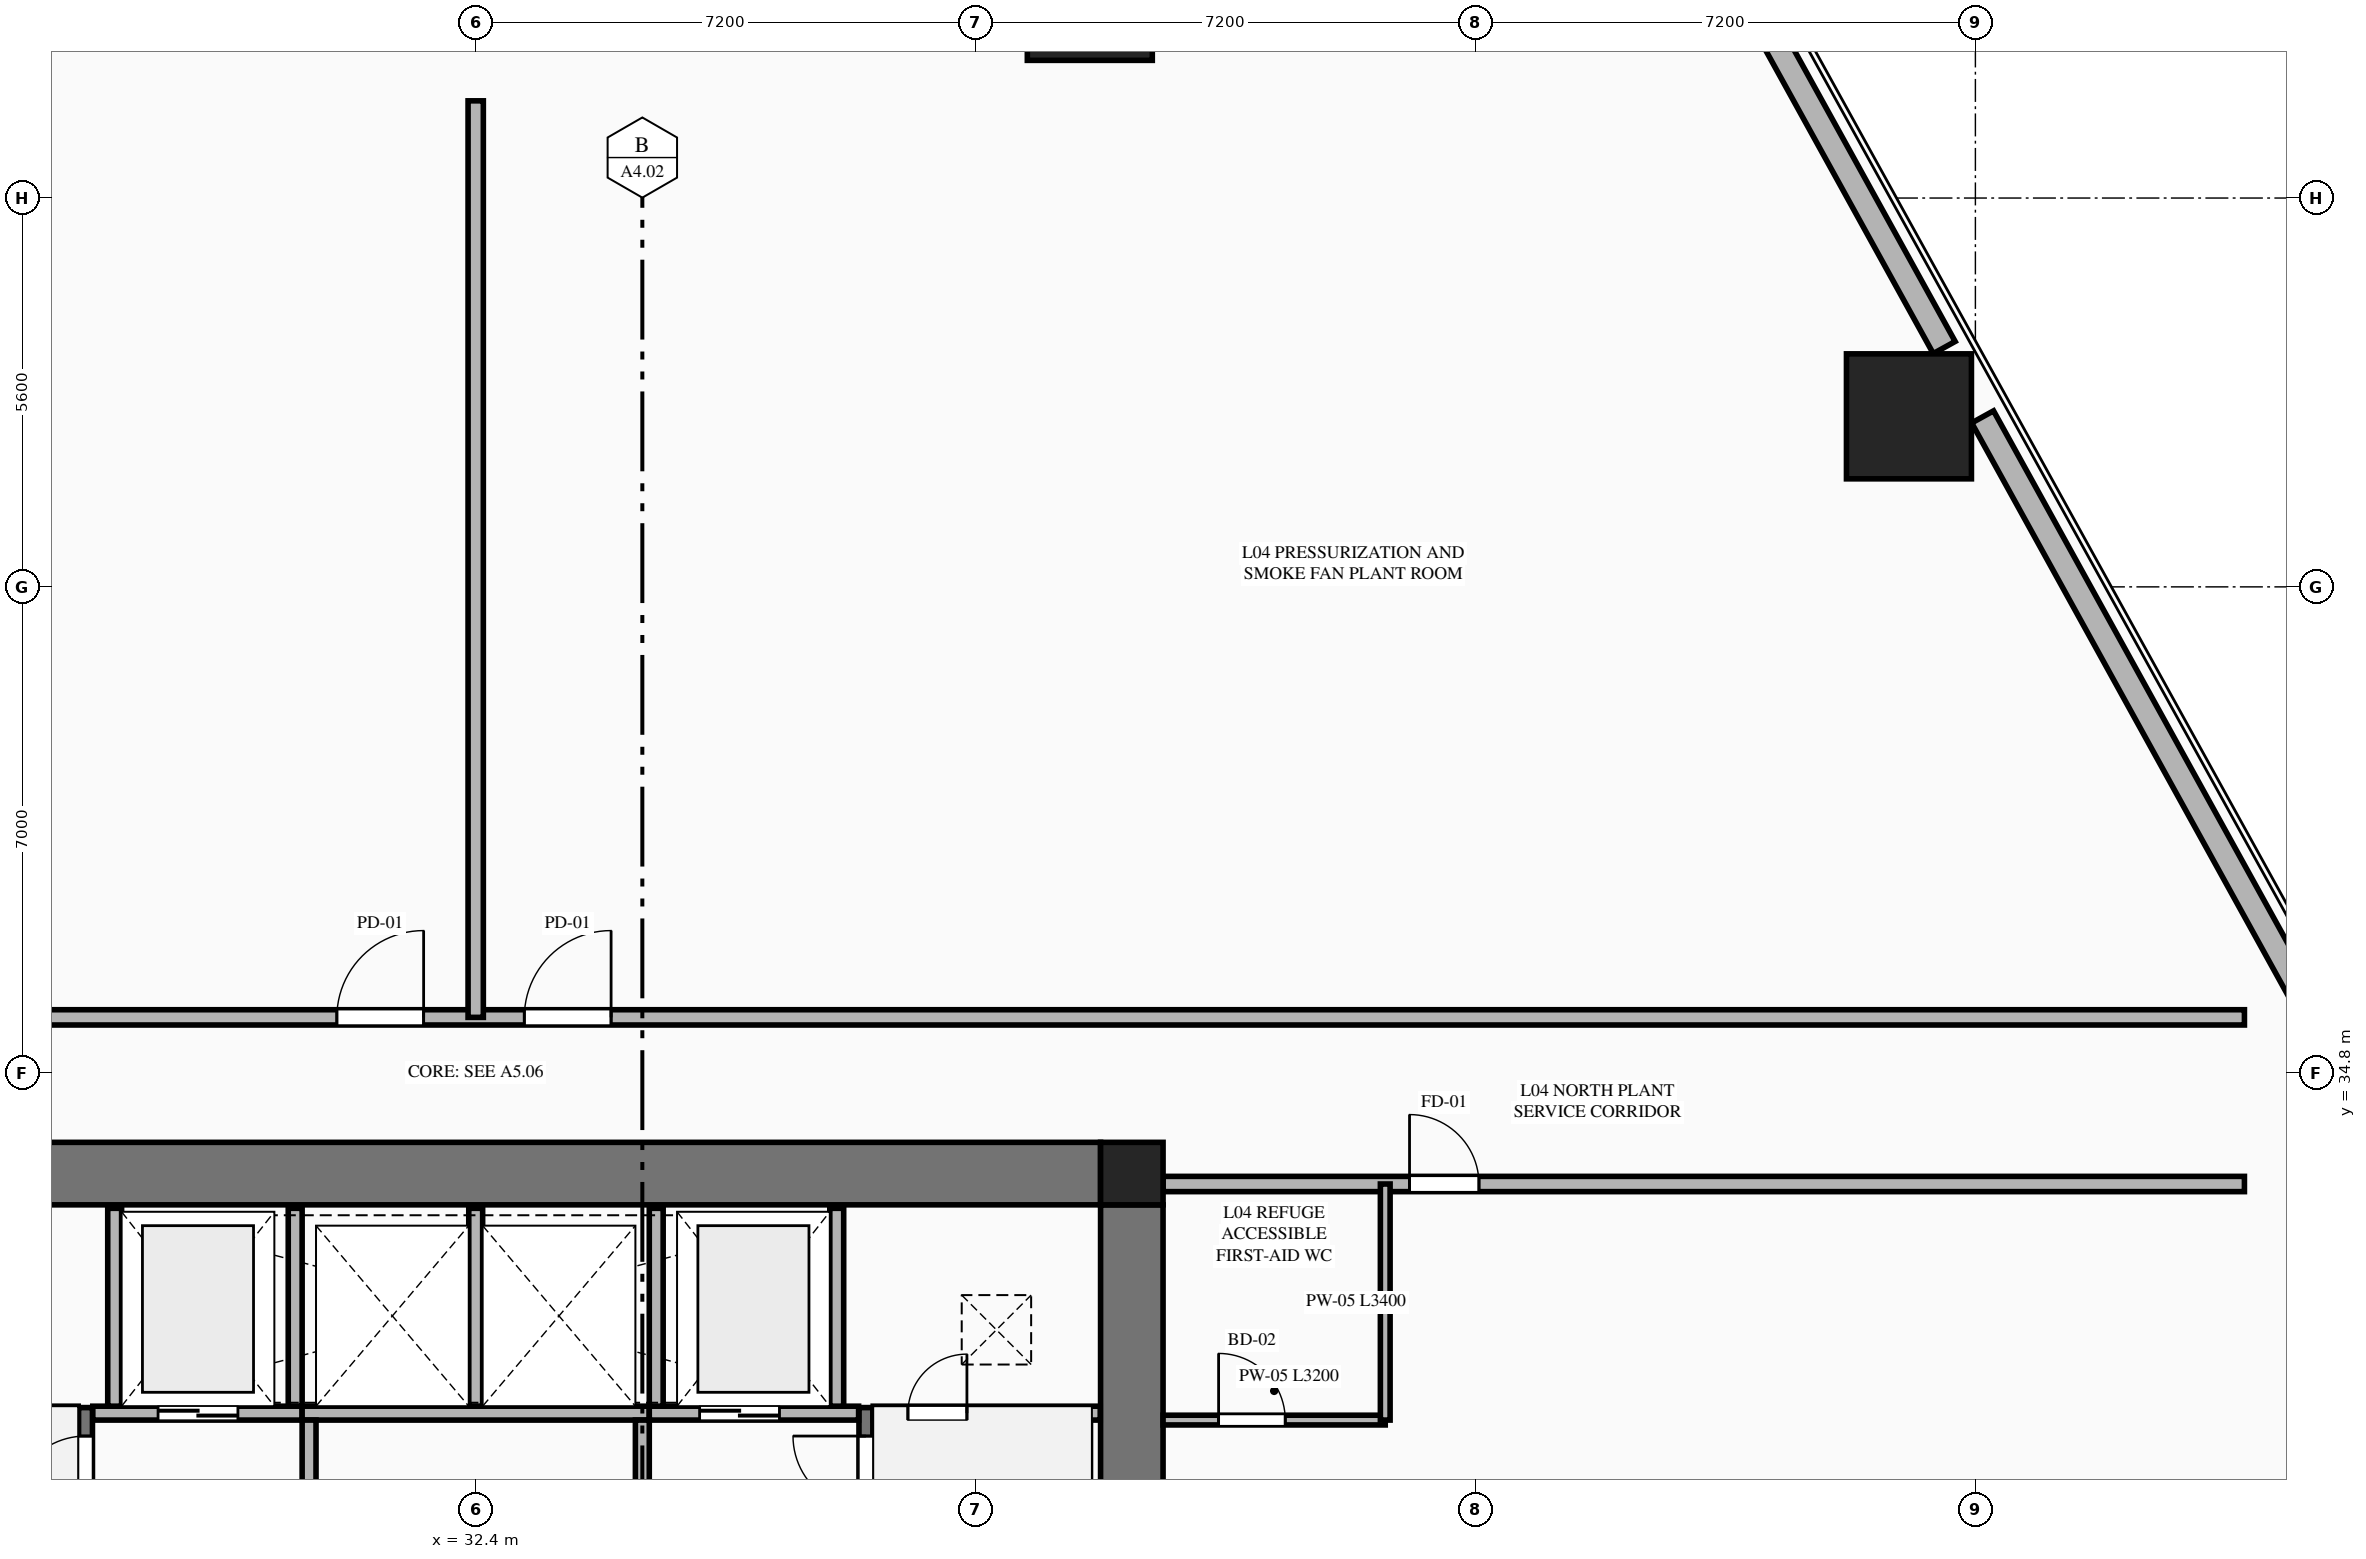
"""IFC4 building model, lengths in metres.
Left out: names, types, materials, properties, quantities, classifications, styles, units other than length and angle.
Written with IfcOpenShell. Run it as: python <this file> out.ifc"""

import sys

from ifc_helpers import new_model, si_unit, direction, frame, frame_2d, origin, origin_2d, place, context, subcontext, project, spatial, rectangle, extrude, element, fill, save


model = new_model("IFC4")
c1 = context("Model", 3, precision=1e-05, world=origin(), true_north=direction((0.0, 1.0)))
c2 = subcontext(c1, "Body", "Model", "MODEL_VIEW")
j1 = project(units=[si_unit("LENGTHUNIT", "METRE"), si_unit("PLANEANGLEUNIT", "RADIAN")], contexts=[c1])
p1 = place(None, origin())
s1 = spatial("IfcSite", under=j1, at=p1, CompositionType="ELEMENT")
p2 = place(p1, origin())
s2 = spatial("IfcBuilding", under=s1, at=p2, CompositionType="ELEMENT")
p3 = place(p2, frame((0.0, 0.0, 19.5)))
s3 = spatial("IfcBuildingStorey", under=s2, at=p3, CompositionType="ELEMENT", Elevation=19.5)
p4 = place(p3, frame((41.85, 33.35, 0.0), z_axis=(0.0, 0.0, 1.0), x_axis=(1.0, 0.0, 0.0)))
e1 = element("IfcColumn", 1, at=p4, inside=s3, PredefinedType="COLUMN", context=c2, shape_type="SweptSolid", body=[
    extrude(rectangle(XDim=0.9, YDim=0.9, at=origin_2d()), origin(), (0.0, 0.0, 1.0), 5.4),
])
p5 = place(p3, frame((23.4, 33.35, 0.0), z_axis=(0.0, 0.0, 1.0), x_axis=(1.0, 0.0, 0.0)))
e2 = element("IfcWall", 2, at=p5, inside=s3, PredefinedType="SHEAR", context=c2, shape_type="SweptSolid", body=[
    extrude(rectangle(XDim=18.0, YDim=0.9, at=frame_2d((9.0, 0.0))), origin(), (0.0, 0.0, 1.0), 5.18),
])
p6 = place(p3, frame((41.85, 18.9, 0.0), z_axis=(0.0, 0.0, 1.0), x_axis=(0.0, 1.0, 0.0)))
e3 = element("IfcWall", 3, at=p6, inside=s3, PredefinedType="SHEAR", context=c2, shape_type="SweptSolid", body=[
    extrude(rectangle(XDim=14.0, YDim=0.9, at=frame_2d((7.0, 0.0))), origin(), (0.0, 0.0, 1.0), 5.18),
])
p7 = place(p6, frame((2.94, 0.0, 0.0)))
e4 = element("IfcOpeningElement", 4, at=p7, cuts=e3, PredefinedType="OPENING", context=c2, shape_type="SweptSolid", body=[
    extrude(rectangle(XDim=1.22, YDim=2.25, at=frame_2d((0.61, 1.125))), frame((0.0, 0.46, 0.0), z_axis=(0.0, -1.0, 0.0), x_axis=(1.0, 0.0, 0.0)), (0.0, 0.0, 1.0), 0.92),
])
for number, where, z_axis, x_axis in (
    (5, (53.043, 44.256, 0.0), (0.0, 0.0, 1.0), (1.0, 0.0, 0.0)),
    (6, (41.245, 50.283, 0.0), (0.0, 0.0, 1.0), (1.0, 0.0, 0.0)),
):
    element("IfcColumn", number, at=place(p3, frame(where, z_axis=z_axis, x_axis=x_axis)), inside=s3, PredefinedType="COLUMN", context=c2, shape_type="SweptSolid", body=[
        extrude(rectangle(XDim=1.8, YDim=1.8, at=origin_2d()), origin(), (0.0, 0.0, 1.0), 5.4),
    ])
p8 = place(p3, frame((26.78, 23.2, 0.0), z_axis=(0.0, 0.0, 1.0), x_axis=(0.0, 1.0, 0.0)))
e7 = element("IfcWall", 7, at=p8, inside=s3, PredefinedType="SHEAR", context=c2, shape_type="SweptSolid", body=[
    extrude(rectangle(XDim=6.78, YDim=0.2, at=frame_2d((3.39, 0.0))), origin(), (0.0, 0.0, 1.0), 5.4),
])
p9 = place(p8, frame((5.32, 0.0, 0.0)))
e8 = element("IfcOpeningElement", 8, at=p9, cuts=e7, PredefinedType="OPENING", context=c2, shape_type="SweptSolid", body=[
    extrude(rectangle(XDim=1.05, YDim=2.15, at=frame_2d((0.525, 1.075))), frame((0.0, 0.11, 0.0), z_axis=(0.0, -1.0, 0.0), x_axis=(1.0, 0.0, 0.0)), (0.0, 0.0, 1.0), 0.22),
])
p10 = place(p3, frame((38.02, 23.2, 0.0), z_axis=(0.0, 0.0, 1.0), x_axis=(0.0, 1.0, 0.0)))
e9 = element("IfcWall", 9, at=p10, inside=s3, PredefinedType="SHEAR", context=c2, shape_type="SweptSolid", body=[
    extrude(rectangle(XDim=6.78, YDim=0.2, at=frame_2d((3.39, 0.0))), origin(), (0.0, 0.0, 1.0), 5.4),
])
p11 = place(p10, frame((5.32, 0.0, 0.0)))
e10 = element("IfcOpeningElement", 10, at=p11, cuts=e9, PredefinedType="OPENING", context=c2, shape_type="SweptSolid", body=[
    extrude(rectangle(XDim=1.05, YDim=2.15, at=frame_2d((0.525, 1.075))), frame((0.0, 0.11, 0.0), z_axis=(0.0, -1.0, 0.0), x_axis=(1.0, 0.0, 0.0)), (0.0, 0.0, 1.0), 0.22),
])
p12 = place(p3, frame((23.405, 29.9, 0.0), z_axis=(0.0, 0.0, 1.0), x_axis=(1.0, 0.0, 0.0)))
e11 = element("IfcWall", 11, at=p12, inside=s3, PredefinedType="PLUMBINGWALL", context=c2, shape_type="SweptSolid", body=[
    extrude(rectangle(XDim=3.27, YDim=0.2, at=frame_2d((1.635, 0.0))), origin(), (0.0, 0.0, 1.0), 5.18),
])
p13 = place(p12, frame((1.85, 0.0, 0.0)))
e12 = element("IfcOpeningElement", 12, at=p13, cuts=e11, PredefinedType="OPENING", context=c2, shape_type="SweptSolid", body=[
    extrude(rectangle(XDim=0.85, YDim=2.05, at=frame_2d((0.425, 1.025))), frame((0.0, 0.11, 0.0), z_axis=(0.0, -1.0, 0.0), x_axis=(1.0, 0.0, 0.0)), (0.0, 0.0, 1.0), 0.22),
])
p14 = place(p3, frame((26.885, 29.9, 0.0), z_axis=(0.0, 0.0, 1.0), x_axis=(1.0, 0.0, 0.0)))
e13 = element("IfcWall", 13, at=p14, inside=s3, PredefinedType="PLUMBINGWALL", context=c2, shape_type="SweptSolid", body=[
    extrude(rectangle(XDim=3.015, YDim=0.2, at=frame_2d((1.507, 0.0))), origin(), (0.0, 0.0, 1.0), 5.18),
])
p15 = place(p14, frame((0.94, 0.0, 0.0)))
e14 = element("IfcOpeningElement", 14, at=p15, cuts=e13, PredefinedType="OPENING", context=c2, shape_type="SweptSolid", body=[
    extrude(rectangle(XDim=1.15, YDim=2.2, at=frame_2d((0.575, 1.1))), frame((0.0, 0.11, 0.0), z_axis=(0.0, -1.0, 0.0), x_axis=(1.0, 0.0, 0.0)), (0.0, 0.0, 1.0), 0.22),
])
p16 = place(p3, frame((29.9, 29.9, 0.0), z_axis=(0.0, 0.0, 1.0), x_axis=(1.0, 0.0, 0.0)))
e15 = element("IfcWall", 15, at=p16, inside=s3, PredefinedType="PLUMBINGWALL", context=c2, shape_type="SweptSolid", body=[
    extrude(rectangle(XDim=5.0, YDim=0.2, at=frame_2d((2.5, 0.0))), origin(), (0.0, 0.0, 1.0), 5.18),
])
p17 = place(p3, frame((34.9, 29.9, 0.0), z_axis=(0.0, 0.0, 1.0), x_axis=(1.0, 0.0, 0.0)))
e16 = element("IfcWall", 16, at=p17, inside=s3, PredefinedType="PLUMBINGWALL", context=c2, shape_type="SweptSolid", body=[
    extrude(rectangle(XDim=3.015, YDim=0.2, at=frame_2d((1.508, 0.0))), origin(), (0.0, 0.0, 1.0), 5.18),
])
p18 = place(p17, frame((0.725, 0.0, 0.0)))
e17 = element("IfcOpeningElement", 17, at=p18, cuts=e16, PredefinedType="OPENING", context=c2, shape_type="SweptSolid", body=[
    extrude(rectangle(XDim=1.15, YDim=2.2, at=frame_2d((0.575, 1.1))), frame((0.0, 0.11, 0.0), z_axis=(0.0, -1.0, 0.0), x_axis=(1.0, 0.0, 0.0)), (0.0, 0.0, 1.0), 0.22),
])
p19 = place(p3, frame((38.125, 29.9, 0.0), z_axis=(0.0, 0.0, 1.0), x_axis=(1.0, 0.0, 0.0)))
e18 = element("IfcWall", 18, at=p19, inside=s3, PredefinedType="PLUMBINGWALL", context=c2, shape_type="SweptSolid", body=[
    extrude(rectangle(XDim=3.27, YDim=0.2, at=frame_2d((1.635, 0.0))), origin(), (0.0, 0.0, 1.0), 5.18),
])
p20 = place(p19, frame((0.5, 0.0, 0.0)))
e19 = element("IfcOpeningElement", 19, at=p20, cuts=e18, PredefinedType="OPENING", context=c2, shape_type="SweptSolid", body=[
    extrude(rectangle(XDim=0.85, YDim=2.05, at=frame_2d((0.425, 1.025))), frame((0.0, 0.11, 0.0), z_axis=(0.0, -1.0, 0.0), x_axis=(1.0, 0.0, 0.0)), (0.0, 0.0, 1.0), 0.22),
])
for number, where, z_axis, x_axis in (
    (20, (27.2, 30.0, 0.0), (0.0, 0.0, 1.0), (0.0, 1.0, 0.0)),
    (21, (29.8, 30.0, 0.0), (0.0, 0.0, 1.0), (0.0, 1.0, 0.0)),
    (22, (32.4, 30.0, 0.0), (0.0, 0.0, 1.0), (0.0, 1.0, 0.0)),
    (23, (35.0, 30.0, 0.0), (0.0, 0.0, 1.0), (0.0, 1.0, 0.0)),
    (24, (37.6, 30.0, 0.0), (0.0, 0.0, 1.0), (0.0, 1.0, 0.0)),
):
    element("IfcWall", number, at=place(p3, frame(where, z_axis=z_axis, x_axis=x_axis)), inside=s3, PredefinedType="PLUMBINGWALL", context=c2, shape_type="SweptSolid", body=[
        extrude(rectangle(XDim=2.85, YDim=0.2, at=frame_2d((1.425, 0.0))), origin(), (0.0, 0.0, 1.0), 5.18),
    ])
p21 = place(p3, frame((30.0, 27.05, 0.0), z_axis=(0.0, 0.0, 1.0), x_axis=(0.0, 1.0, 0.0)))
e25 = element("IfcWall", 25, at=p21, inside=s3, PredefinedType="PLUMBINGWALL", context=c2, shape_type="SweptSolid", body=[
    extrude(rectangle(XDim=2.75, YDim=0.2, at=frame_2d((1.375, 0.0))), origin(), (0.0, 0.0, 1.0), 5.18),
])
p22 = place(p21, frame((0.85, 0.0, 0.0)))
e26 = element("IfcOpeningElement", 26, at=p22, cuts=e25, PredefinedType="OPENING", context=c2, shape_type="SweptSolid", body=[
    extrude(rectangle(XDim=1.0, YDim=2.15, at=frame_2d((0.5, 1.075))), frame((0.0, 0.11, 0.0), z_axis=(0.0, -1.0, 0.0), x_axis=(1.0, 0.0, 0.0)), (0.0, 0.0, 1.0), 0.22),
])
p23 = place(p3, frame((34.8, 27.05, 0.0), z_axis=(0.0, 0.0, 1.0), x_axis=(0.0, 1.0, 0.0)))
e27 = element("IfcWall", 27, at=p23, inside=s3, PredefinedType="PLUMBINGWALL", context=c2, shape_type="SweptSolid", body=[
    extrude(rectangle(XDim=2.75, YDim=0.2, at=frame_2d((1.375, 0.0))), origin(), (0.0, 0.0, 1.0), 5.18),
])
p24 = place(p23, frame((0.85, 0.0, 0.0)))
e28 = element("IfcOpeningElement", 28, at=p24, cuts=e27, PredefinedType="OPENING", context=c2, shape_type="SweptSolid", body=[
    extrude(rectangle(XDim=1.0, YDim=2.15, at=frame_2d((0.5, 1.075))), frame((0.0, 0.11, 0.0), z_axis=(0.0, -1.0, 0.0), x_axis=(1.0, 0.0, 0.0)), (0.0, 0.0, 1.0), 0.22),
])
p25 = place(p3, frame((42.3, 33.2, 0.0), z_axis=(0.0, 0.0, 1.0), x_axis=(1.0, 0.0, 0.0)))
e29 = element("IfcWall", 29, at=p25, inside=s3, PredefinedType="PARTITIONING", context=c2, shape_type="SweptSolid", body=[
    extrude(rectangle(XDim=15.575, YDim=0.22, at=frame_2d((7.788, 0.0))), origin(), (0.0, 0.0, 1.0), 3.79),
])
p26 = place(p25, frame((3.55, 0.0, 0.0)))
e30 = element("IfcOpeningElement", 30, at=p26, cuts=e29, PredefinedType="OPENING", context=c2, shape_type="SweptSolid", body=[
    extrude(rectangle(XDim=1.0, YDim=2.15, at=frame_2d((0.5, 1.075))), frame((0.0, 0.12, 0.0), z_axis=(0.0, -1.0, 0.0), x_axis=(1.0, 0.0, 0.0)), (0.0, 0.0, 1.0), 0.24),
])
p27 = place(p3, frame((42.3, 29.8, 0.0), z_axis=(0.0, 0.0, 1.0), x_axis=(1.0, 0.0, 0.0)))
e31 = element("IfcWall", 31, at=p27, inside=s3, PredefinedType="PLUMBINGWALL", context=c2, shape_type="SweptSolid", body=[
    extrude(rectangle(XDim=3.2, YDim=0.14, at=frame_2d((1.6, 0.0))), origin(), (0.0, 0.0, 1.0), 5.18),
])
p28 = place(p27, frame((0.8, 0.0, 0.0)))
e32 = element("IfcOpeningElement", 32, at=p28, cuts=e31, PredefinedType="OPENING", context=c2, shape_type="SweptSolid", body=[
    extrude(rectangle(XDim=0.96, YDim=2.15, at=frame_2d((0.48, 1.075))), frame((0.0, 0.08, 0.0), z_axis=(0.0, -1.0, 0.0), x_axis=(1.0, 0.0, 0.0)), (0.0, 0.0, 1.0), 0.16),
])
p29 = place(p3, frame((45.5, 29.8, 0.0), z_axis=(0.0, 0.0, 1.0), x_axis=(0.0, 1.0, 0.0)))
e33 = element("IfcWall", 33, at=p29, inside=s3, PredefinedType="PLUMBINGWALL", context=c2, shape_type="SweptSolid", body=[
    extrude(rectangle(XDim=3.4, YDim=0.14, at=frame_2d((1.7, 0.0))), origin(), (0.0, 0.0, 1.0), 5.18),
])
p30 = place(p3, frame((6.925, 35.6, 0.0), z_axis=(0.0, 0.0, 1.0), x_axis=(1.0, 0.0, 0.0)))
e34 = element("IfcWall", 34, at=p30, inside=s3, PredefinedType="PARTITIONING", context=c2, shape_type="SweptSolid", body=[
    extrude(rectangle(XDim=50.95, YDim=0.22, at=frame_2d((25.475, 0.0))), origin(), (0.0, 0.0, 1.0), 5.18),
])
p31 = place(p30, frame((23.475, 0.0, 0.0)))
e35 = element("IfcOpeningElement", 35, at=p31, cuts=e34, PredefinedType="OPENING", context=c2, shape_type="SweptSolid", body=[
    extrude(rectangle(XDim=1.25, YDim=2.25, at=frame_2d((0.625, 1.125))), frame((0.0, 0.12, 0.0), z_axis=(0.0, -1.0, 0.0), x_axis=(1.0, 0.0, 0.0)), (0.0, 0.0, 1.0), 0.24),
])
p32 = place(p30, frame((26.175, 0.0, 0.0)))
e36 = element("IfcOpeningElement", 36, at=p32, cuts=e34, PredefinedType="OPENING", context=c2, shape_type="SweptSolid", body=[
    extrude(rectangle(XDim=1.25, YDim=2.25, at=frame_2d((0.625, 1.125))), frame((0.0, 0.12, 0.0), z_axis=(0.0, -1.0, 0.0), x_axis=(1.0, 0.0, 0.0)), (0.0, 0.0, 1.0), 0.24),
])
p33 = place(p3, frame((32.4, 35.6, 0.0), z_axis=(0.0, 0.0, 1.0), x_axis=(0.0, 1.0, 0.0)))
e37 = element("IfcWall", 37, at=p33, inside=s3, PredefinedType="PARTITIONING", context=c2, shape_type="SweptSolid", body=[
    extrude(rectangle(XDim=13.2, YDim=0.22, at=frame_2d((6.6, 0.0))), origin(), (0.0, 0.0, 1.0), 5.18),
])
p34 = place(p3, frame((60.375, 32.899, 0.0), z_axis=(0.0, 0.0, 1.0), x_axis=(-0.483633730108, 0.87527048111, 0.0)))
e38 = element("IfcWall", 38, at=p34, inside=s3, PredefinedType="STANDARD", context=c2, shape_type="SweptSolid", body=[
    extrude(rectangle(XDim=12.966, YDim=0.36, at=frame_2d((6.483, 0.0))), origin(), (0.0, 0.0, 1.0), 5.18),
])
p35 = place(p3, frame((53.551, 45.247, 0.0), z_axis=(0.0, 0.0, 1.0), x_axis=(-0.483661702077, 0.875255024518, 0.0)))
e39 = element("IfcWall", 39, at=p35, inside=s3, PredefinedType="STANDARD", context=c2, shape_type="SweptSolid", body=[
    extrude(rectangle(XDim=5.444, YDim=0.36, at=frame_2d((2.722, 0.0))), origin(), (0.0, 0.0, 1.0), 5.18),
])
p36 = place(p9, origin())
e40 = element("IfcDoor", 40, at=p36, inside=s3, OperationType="SINGLE_SWING_LEFT", PredefinedType="DOOR", context=c2, shape_type="SweptSolid", body=[
    extrude(rectangle(XDim=1.05, YDim=2.15, at=frame_2d((0.525, 1.075))), frame((0.0, 0.025, 0.0), z_axis=(0.0, -1.0, 0.0), x_axis=(1.0, 0.0, 0.0)), (0.0, 0.0, 1.0), 0.05),
])
fill(e8, e40)
p37 = place(p11, origin())
e41 = element("IfcDoor", 41, at=p37, inside=s3, OperationType="SINGLE_SWING_RIGHT", PredefinedType="DOOR", context=c2, shape_type="SweptSolid", body=[
    extrude(rectangle(XDim=1.05, YDim=2.15, at=frame_2d((0.525, 1.075))), frame((0.0, 0.025, 0.0), z_axis=(0.0, -1.0, 0.0), x_axis=(1.0, 0.0, 0.0)), (0.0, 0.0, 1.0), 0.05),
])
fill(e10, e41)
p38 = place(p20, origin())
e42 = element("IfcDoor", 42, at=p38, inside=s3, OperationType="SINGLE_SWING_RIGHT", PredefinedType="DOOR", context=c2, shape_type="SweptSolid", body=[
    extrude(rectangle(XDim=0.85, YDim=2.05, at=frame_2d((0.425, 1.025))), frame((0.0, 0.025, 0.0), z_axis=(0.0, -1.0, 0.0), x_axis=(1.0, 0.0, 0.0)), (0.0, 0.0, 1.0), 0.05),
])
fill(e19, e42)
p39 = place(p15, origin())
e43 = element("IfcDoor", 43, at=p39, inside=s3, OperationType="DOUBLE_DOOR_SLIDING", PredefinedType="DOOR", context=c2, shape_type="SweptSolid", body=[
    extrude(rectangle(XDim=1.15, YDim=2.2, at=frame_2d((0.575, 1.1))), frame((0.0, 0.025, 0.0), z_axis=(0.0, -1.0, 0.0), x_axis=(1.0, 0.0, 0.0)), (0.0, 0.0, 1.0), 0.05),
])
fill(e14, e43)
p40 = place(p18, origin())
e44 = element("IfcDoor", 44, at=p40, inside=s3, OperationType="DOUBLE_DOOR_SLIDING", PredefinedType="DOOR", context=c2, shape_type="SweptSolid", body=[
    extrude(rectangle(XDim=1.15, YDim=2.2, at=frame_2d((0.575, 1.1))), frame((0.0, 0.025, 0.0), z_axis=(0.0, -1.0, 0.0), x_axis=(1.0, 0.0, 0.0)), (0.0, 0.0, 1.0), 0.05),
])
fill(e17, e44)
p41 = place(p28, origin())
e45 = element("IfcDoor", 45, at=p41, inside=s3, OperationType="SINGLE_SWING_LEFT", PredefinedType="DOOR", context=c2, shape_type="SweptSolid", body=[
    extrude(rectangle(XDim=0.96, YDim=2.15, at=frame_2d((0.48, 1.075))), frame((0.0, 0.025, 0.0), z_axis=(0.0, -1.0, 0.0), x_axis=(1.0, 0.0, 0.0)), (0.0, 0.0, 1.0), 0.05),
])
fill(e32, e45)
p42 = place(p26, origin())
e46 = element("IfcDoor", 46, at=p42, inside=s3, OperationType="SINGLE_SWING_LEFT", PredefinedType="DOOR", context=c2, shape_type="SweptSolid", body=[
    extrude(rectangle(XDim=1.0, YDim=2.15, at=frame_2d((0.5, 1.075))), frame((0.0, 0.025, 0.0), z_axis=(0.0, -1.0, 0.0), x_axis=(1.0, 0.0, 0.0)), (0.0, 0.0, 1.0), 0.05),
])
fill(e30, e46)
p43 = place(p31, origin())
e47 = element("IfcDoor", 47, at=p43, inside=s3, OperationType="SINGLE_SWING_RIGHT", PredefinedType="DOOR", context=c2, shape_type="SweptSolid", body=[
    extrude(rectangle(XDim=1.25, YDim=2.25, at=frame_2d((0.625, 1.125))), frame((0.0, 0.025, 0.0), z_axis=(0.0, -1.0, 0.0), x_axis=(1.0, 0.0, 0.0)), (0.0, 0.0, 1.0), 0.05),
])
fill(e35, e47)
p44 = place(p32, origin())
e48 = element("IfcDoor", 48, at=p44, inside=s3, OperationType="SINGLE_SWING_RIGHT", PredefinedType="DOOR", context=c2, shape_type="SweptSolid", body=[
    extrude(rectangle(XDim=1.25, YDim=2.25, at=frame_2d((0.625, 1.125))), frame((0.0, 0.025, 0.0), z_axis=(0.0, -1.0, 0.0), x_axis=(1.0, 0.0, 0.0)), (0.0, 0.0, 1.0), 0.05),
])
fill(e36, e48)
save(model, sys.argv[1])
